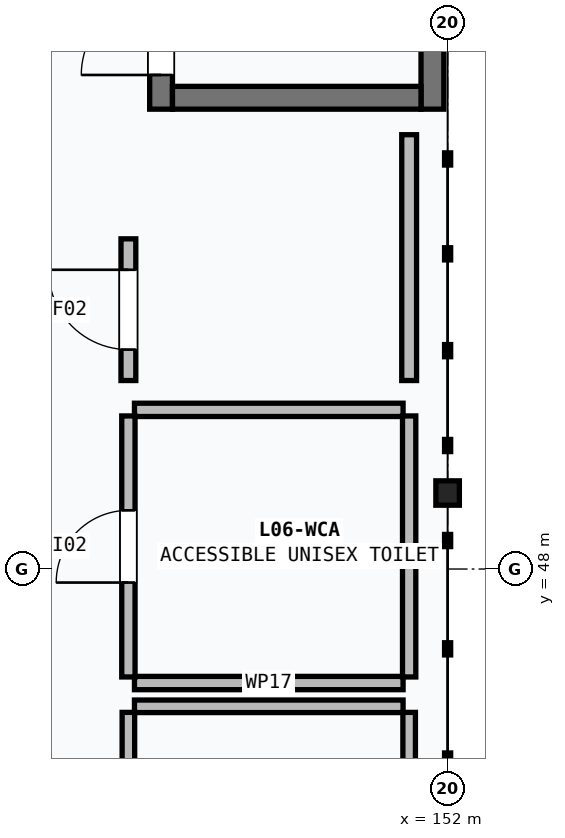
"""IFC4 building model, lengths in metres.
Left out: names, types, materials, properties, quantities, classifications, styles, units other than length and angle.
Written with IfcOpenShell. Run it as: python <this file> out.ifc"""

import sys

from ifc_helpers import new_model, si_unit, direction, frame, frame_2d, origin, origin_2d, place, context, subcontext, project, spatial, rectangle, i_section, extrude, element, fill, save


model = new_model("IFC4")
c1 = context("Model", 3, precision=1e-05, world=origin(), true_north=direction((0.0, 1.0)))
c2 = subcontext(c1, "Body", "Model", "MODEL_VIEW")
j1 = project(units=[si_unit("LENGTHUNIT", "METRE"), si_unit("PLANEANGLEUNIT", "RADIAN")], contexts=[c1])
p1 = place(None, origin())
s1 = spatial("IfcSite", under=j1, at=p1, CompositionType="ELEMENT")
p2 = place(p1, origin())
s2 = spatial("IfcBuilding", under=s1, at=p2, CompositionType="ELEMENT")
p3 = place(p2, frame((0.0, 0.0, 22.8)))
s3 = spatial("IfcBuildingStorey", under=s2, at=p3, CompositionType="ELEMENT", Elevation=22.8)
p4 = place(p3, frame((152.0, 49.0, 0.0), z_axis=(0.0, 0.0, 1.0), x_axis=(1.0, 0.0, 0.0)))
e1 = element("IfcColumn", 1, at=p4, inside=s3, PredefinedType="COLUMN", context=c2, shape_type="SweptSolid", body=[
    extrude(i_section(OverallWidth=0.309, OverallDepth=0.321, WebThickness=0.014, FlangeThickness=0.022, FilletRadius=0.015, at=origin_2d()), origin(), (0.0, 0.0, 1.0), 4.2),
])
p5 = place(p3, frame((148.23, 54.05, 0.0), z_axis=(0.0, 0.0, 1.0), x_axis=(0.0, 1.0, 0.0)))
e2 = element("IfcWall", 2, at=p5, inside=s3, PredefinedType="SHEAR", context=c2, shape_type="SweptSolid", body=[
    extrude(rectangle(XDim=9.9, YDim=0.3, at=frame_2d((4.95, 0.0))), origin(), (0.0, 0.0, 1.0), 4.2),
])
p6 = place(p5, frame((0.45, 0.0, 0.0)))
e3 = element("IfcOpeningElement", 3, at=p6, cuts=e2, PredefinedType="OPENING", context=c2, shape_type="SweptSolid", body=[
    extrude(rectangle(XDim=1.05, YDim=2.15, at=frame_2d((0.525, 1.075))), frame((0.0, 0.16, 0.0), z_axis=(0.0, -1.0, 0.0), x_axis=(1.0, 0.0, 0.0)), (0.0, 0.0, 1.0), 0.32),
])
p7 = place(p3, frame((151.8, 63.95, 0.0), z_axis=(0.0, 0.0, 1.0), x_axis=(0.0, -1.0, 0.0)))
e4 = element("IfcWall", 4, at=p7, inside=s3, PredefinedType="SHEAR", context=c2, shape_type="SweptSolid", body=[
    extrude(rectangle(XDim=9.9, YDim=0.3, at=frame_2d((4.95, 0.0))), origin(), (0.0, 0.0, 1.0), 4.2),
])
p8 = place(p3, frame((151.65, 54.2, 0.0), z_axis=(0.0, 0.0, 1.0), x_axis=(-1.0, 0.0, 0.0)))
e5 = element("IfcWall", 5, at=p8, inside=s3, PredefinedType="SHEAR", context=c2, shape_type="SweptSolid", body=[
    extrude(rectangle(XDim=3.27, YDim=0.3, at=frame_2d((1.635, 0.0))), origin(), (0.0, 0.0, 1.0), 4.2),
])
p9 = place(p3, frame((147.88, 46.194, 0.0), z_axis=(0.0, 0.0, 1.0), x_axis=(1.0, 0.0, 0.0)))
e6 = element("IfcWall", 6, at=p9, inside=s3, PredefinedType="PARTITIONING", context=c2, shape_type="SweptSolid", body=[
    extrude(rectangle(XDim=3.534, YDim=0.165, at=frame_2d((1.767, 0.0))), origin(), (0.0, 0.0, 1.0), 3.945),
])
p10 = place(p3, frame((147.8, 42.68, 0.0), z_axis=(0.0, 0.0, 1.0), x_axis=(0.0, 1.0, 0.0)))
e7 = element("IfcWall", 7, at=p10, inside=s3, PredefinedType="PARTITIONING", context=c2, shape_type="SweptSolid", body=[
    extrude(rectangle(XDim=3.434, YDim=0.165, at=frame_2d((1.717, 0.0))), origin(), (0.0, 0.0, 1.0), 3.945),
])
p11 = place(p10, frame((1.267, 0.0, 0.0)))
e8 = element("IfcOpeningElement", 8, at=p11, cuts=e7, PredefinedType="OPENING", context=c2, shape_type="SweptSolid", body=[
    extrude(rectangle(XDim=0.9, YDim=2.1, at=frame_2d((0.45, 1.05))), frame((0.0, 0.093, 0.0), z_axis=(0.0, -1.0, 0.0), x_axis=(1.0, 0.0, 0.0)), (0.0, 0.0, 1.0), 0.185),
])
p12 = place(p3, frame((151.494, 42.68, 0.0), z_axis=(0.0, 0.0, 1.0), x_axis=(0.0, 1.0, 0.0)))
e9 = element("IfcWall", 9, at=p12, inside=s3, PredefinedType="PARTITIONING", context=c2, shape_type="SweptSolid", body=[
    extrude(rectangle(XDim=3.434, YDim=0.165, at=frame_2d((1.717, 0.0))), origin(), (0.0, 0.0, 1.0), 3.945),
])
for number, where, z_axis, x_axis in (
    (10, (147.88, 46.5, 0.0), (0.0, 0.0, 1.0), (1.0, 0.0, 0.0)),
    (11, (147.88, 50.094, 0.0), (0.0, 0.0, 1.0), (1.0, 0.0, 0.0)),
):
    element("IfcWall", number, at=place(p3, frame(where, z_axis=z_axis, x_axis=x_axis)), inside=s3, PredefinedType="PARTITIONING", context=c2, shape_type="SweptSolid", body=[
        extrude(rectangle(XDim=3.534, YDim=0.175, at=frame_2d((1.767, 0.0))), origin(), (0.0, 0.0, 1.0), 3.945),
    ])
p13 = place(p3, frame((147.8, 46.58, 0.0), z_axis=(0.0, 0.0, 1.0), x_axis=(0.0, 1.0, 0.0)))
e12 = element("IfcWall", 12, at=p13, inside=s3, PredefinedType="PARTITIONING", context=c2, shape_type="SweptSolid", body=[
    extrude(rectangle(XDim=3.434, YDim=0.175, at=frame_2d((1.717, 0.0))), origin(), (0.0, 0.0, 1.0), 3.315),
])
p14 = place(p13, frame((1.242, 0.0, 0.0)))
e13 = element("IfcOpeningElement", 13, at=p14, cuts=e12, PredefinedType="OPENING", context=c2, shape_type="SweptSolid", body=[
    extrude(rectangle(XDim=0.95, YDim=2.1, at=frame_2d((0.475, 1.05))), frame((0.0, 0.098, 0.0), z_axis=(0.0, -1.0, 0.0), x_axis=(1.0, 0.0, 0.0)), (0.0, 0.0, 1.0), 0.195),
])
p15 = place(p3, frame((151.494, 46.58, 0.0), z_axis=(0.0, 0.0, 1.0), x_axis=(0.0, 1.0, 0.0)))
e14 = element("IfcWall", 14, at=p15, inside=s3, PredefinedType="PARTITIONING", context=c2, shape_type="SweptSolid", body=[
    extrude(rectangle(XDim=3.434, YDim=0.175, at=frame_2d((1.717, 0.0))), origin(), (0.0, 0.0, 1.0), 3.315),
])
p16 = place(p3, frame((147.8, 50.48, 0.0), z_axis=(0.0, 0.0, 1.0), x_axis=(0.0, 1.0, 0.0)))
e15 = element("IfcWall", 15, at=p16, inside=s3, PredefinedType="PARTITIONING", context=c2, shape_type="SweptSolid", body=[
    extrude(rectangle(XDim=1.864, YDim=0.195, at=frame_2d((0.932, 0.0))), origin(), (0.0, 0.0, 1.0), 3.945),
])
p17 = place(p16, frame((0.407, 0.0, 0.0)))
e16 = element("IfcOpeningElement", 16, at=p17, cuts=e15, PredefinedType="OPENING", context=c2, shape_type="SweptSolid", body=[
    extrude(rectangle(XDim=1.05, YDim=2.15, at=frame_2d((0.525, 1.075))), frame((0.0, 0.107, 0.0), z_axis=(0.0, -1.0, 0.0), x_axis=(1.0, 0.0, 0.0)), (0.0, 0.0, 1.0), 0.215),
])
p18 = place(p3, frame((151.494, 50.48, 0.0), z_axis=(0.0, 0.0, 1.0), x_axis=(0.0, 1.0, 0.0)))
e17 = element("IfcWall", 17, at=p18, inside=s3, PredefinedType="PARTITIONING", context=c2, shape_type="SweptSolid", body=[
    extrude(rectangle(XDim=3.234, YDim=0.195, at=frame_2d((1.617, 0.0))), origin(), (0.0, 0.0, 1.0), 3.945),
])
p19 = place(p6, origin())
e18 = element("IfcDoor", 18, at=p19, inside=s3, OperationType="SINGLE_SWING_LEFT", PredefinedType="DOOR", context=c2, shape_type="SweptSolid", body=[
    extrude(rectangle(XDim=1.05, YDim=2.15, at=frame_2d((0.525, 1.075))), frame((0.0, 0.025, 0.0), z_axis=(0.0, -1.0, 0.0), x_axis=(1.0, 0.0, 0.0)), (0.0, 0.0, 1.0), 0.05),
])
fill(e3, e18)
p20 = place(p14, origin())
e19 = element("IfcDoor", 19, at=p20, inside=s3, OperationType="SINGLE_SWING_LEFT", PredefinedType="DOOR", context=c2, shape_type="SweptSolid", body=[
    extrude(rectangle(XDim=0.95, YDim=2.1, at=frame_2d((0.475, 1.05))), frame((0.0, 0.025, 0.0), z_axis=(0.0, -1.0, 0.0), x_axis=(1.0, 0.0, 0.0)), (0.0, 0.0, 1.0), 0.05),
])
fill(e13, e19)
p21 = place(p17, origin())
e20 = element("IfcDoor", 20, at=p21, inside=s3, OperationType="SINGLE_SWING_RIGHT", PredefinedType="DOOR", context=c2, shape_type="SweptSolid", body=[
    extrude(rectangle(XDim=1.05, YDim=2.15, at=frame_2d((0.525, 1.075))), frame((0.0, 0.025, 0.0), z_axis=(0.0, -1.0, 0.0), x_axis=(1.0, 0.0, 0.0)), (0.0, 0.0, 1.0), 0.05),
])
fill(e16, e20)
save(model, sys.argv[1])
